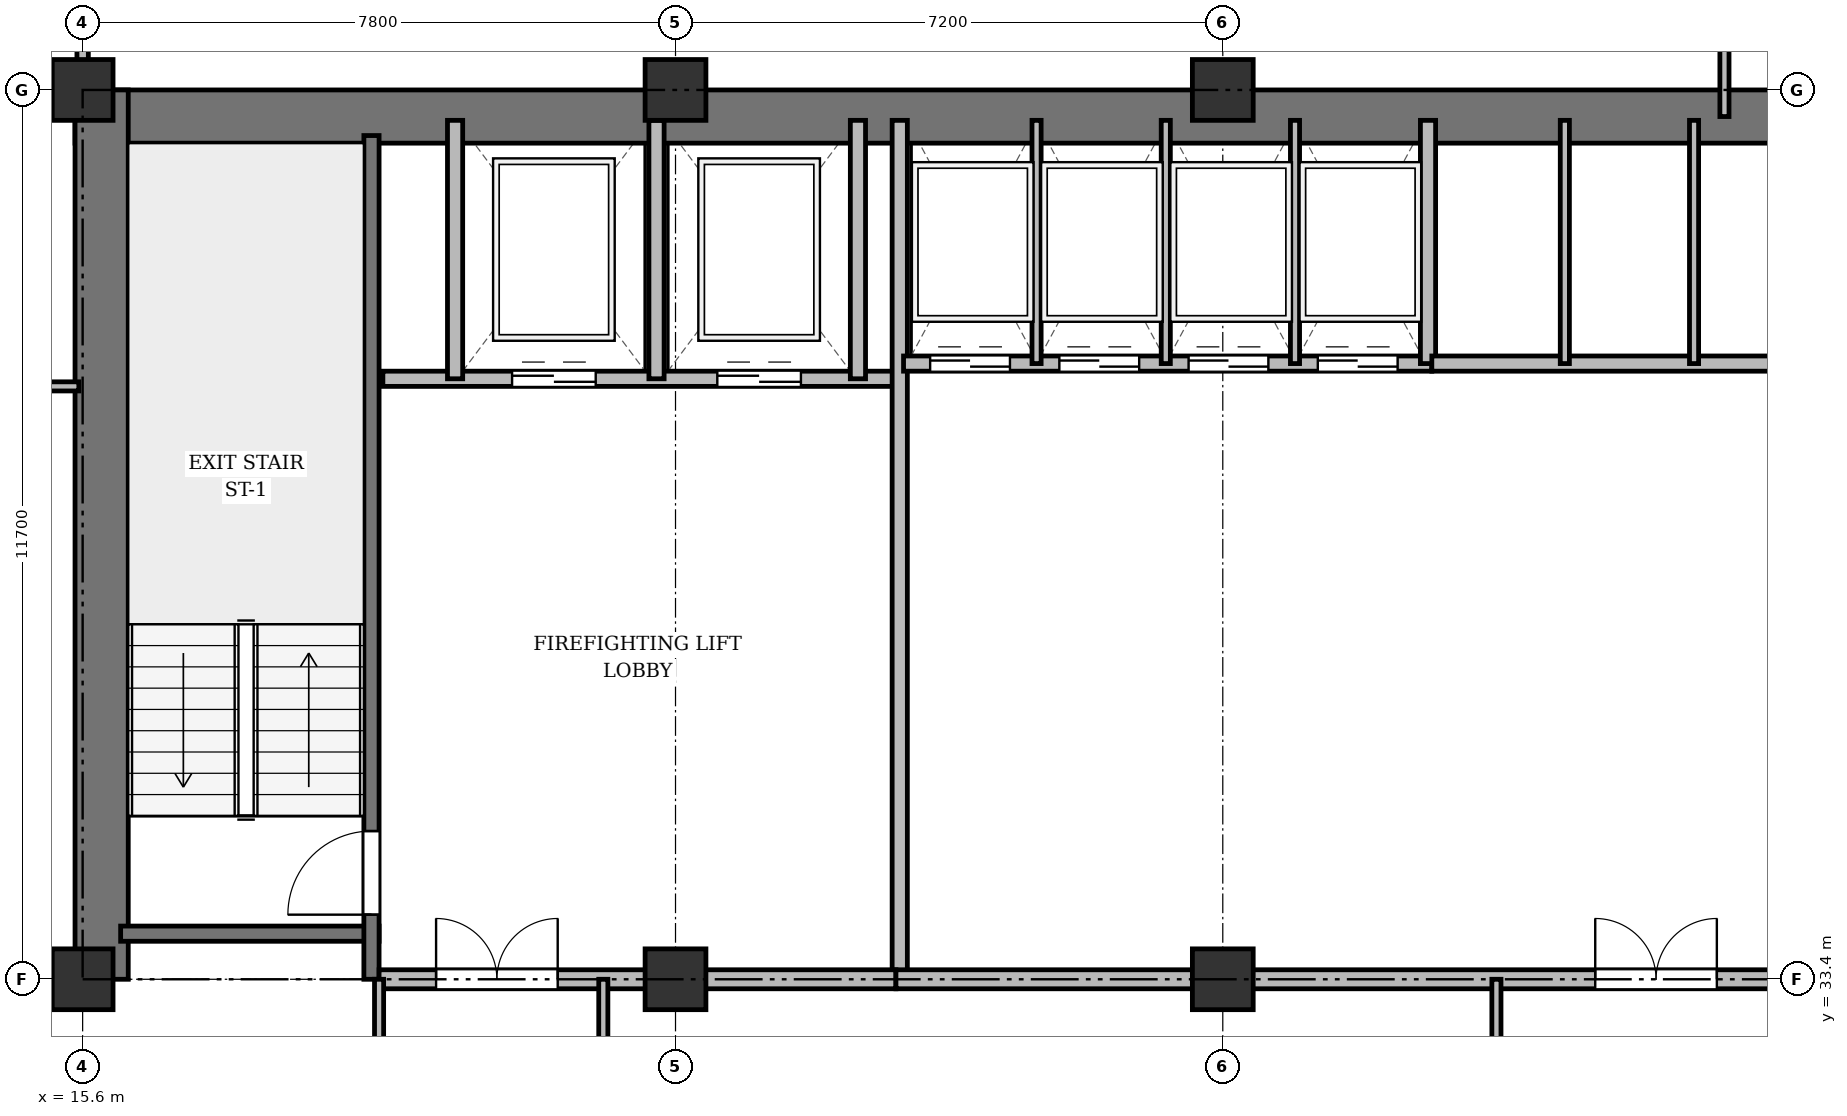
"""IFC4 building model, lengths in metres.
Left out: names, types, materials, properties, quantities, classifications, styles, units other than length and angle.
Written with IfcOpenShell. Run it as: python <this file> out.ifc"""

import sys

from ifc_helpers import new_model, si_unit, direction, frame, frame_2d, origin, origin_2d, place, context, subcontext, project, spatial, rectangle, extrude, source, transform, mapped, element, fill, save


model = new_model("IFC4")
c1 = context("Model", 3, precision=1e-05, world=origin(), true_north=direction((0.0, 1.0)))
c2 = subcontext(c1, "Body", "Model", "MODEL_VIEW")
j1 = project(units=[si_unit("LENGTHUNIT", "METRE"), si_unit("PLANEANGLEUNIT", "RADIAN")], contexts=[c1])
p1 = place(None, origin())
s1 = spatial("IfcSite", under=j1, at=p1, CompositionType="ELEMENT")
p2 = place(p1, origin())
s2 = spatial("IfcBuilding", under=s1, at=p2, CompositionType="ELEMENT")
p3 = place(p2, frame((0.0, 0.0, 81.7)))
s3 = spatial("IfcBuildingStorey", under=s2, at=p3, CompositionType="ELEMENT", Elevation=81.7)
m1 = source(origin(), c2, "Body", "SweptSolid", [
    extrude(rectangle(XDim=0.8, YDim=0.8, at=origin_2d()), origin(), (0.0, 0.0, 1.0), 3.6),
])
for number, where, z_axis, x_axis in (
    (1, (15.6, 33.4, 0.0), (0.0, 0.0, 1.0), (1.0, 0.0, 0.0)),
    (2, (15.6, 45.1, 0.0), (0.0, 0.0, 1.0), (1.0, 0.0, 0.0)),
    (3, (23.4, 33.4, 0.0), (0.0, 0.0, 1.0), (1.0, 0.0, 0.0)),
    (4, (23.4, 45.1, 0.0), (0.0, 0.0, 1.0), (1.0, 0.0, 0.0)),
    (5, (30.6, 33.4, 0.0), (0.0, 0.0, 1.0), (1.0, 0.0, 0.0)),
    (6, (30.6, 45.1, 0.0), (0.0, 0.0, 1.0), (1.0, 0.0, 0.0)),
):
    element("IfcColumn", number, at=place(p3, frame(where, z_axis=z_axis, x_axis=x_axis)), inside=s3, PredefinedType="COLUMN", context=c2, shape_type="MappedRepresentation", body=[
        mapped(m1, transform((0.0, 0.0, 0.0), x_axis=(1.0, 0.0, 0.0), y_axis=(0.0, 1.0, 0.0), z_axis=(0.0, 0.0, 1.0), scale=1.0)),
    ])
p4 = place(p3, frame((15.5, 44.75, 0.0), z_axis=(0.0, 0.0, 1.0), x_axis=(1.0, 0.0, 0.0)))
e7 = element("IfcWall", 7, at=p4, inside=s3, PredefinedType="SHEAR", context=c2, shape_type="SweptSolid", body=[
    extrude(rectangle(XDim=43.4, YDim=0.7, at=frame_2d((21.7, 0.0))), origin(), (0.0, 0.0, 1.0), 3.34),
])
p5 = place(p3, frame((15.85, 33.4, 0.0), z_axis=(0.0, 0.0, 1.0), x_axis=(0.0, 1.0, 0.0)))
e8 = element("IfcWall", 8, at=p5, inside=s3, PredefinedType="SHEAR", context=c2, shape_type="SweptSolid", body=[
    extrude(rectangle(XDim=11.7, YDim=0.7, at=frame_2d((5.85, 0.0))), origin(), (0.0, 0.0, 1.0), 3.34),
])
p6 = place(p3, frame((16.1, 34.0, 0.0), z_axis=(0.0, 0.0, 1.0), x_axis=(1.0, 0.0, 0.0)))
e9 = element("IfcWall", 9, at=p6, inside=s3, PredefinedType="SHEAR", context=c2, shape_type="SweptSolid", body=[
    extrude(rectangle(XDim=3.4, YDim=0.2, at=frame_2d((1.7, 0.0))), origin(), (0.0, 0.0, 1.0), 3.34),
])
p7 = place(p3, frame((19.4, 33.4, 0.0), z_axis=(0.0, 0.0, 1.0), x_axis=(0.0, 1.0, 0.0)))
e10 = element("IfcWall", 10, at=p7, inside=s3, PredefinedType="SHEAR", context=c2, shape_type="SweptSolid", body=[
    extrude(rectangle(XDim=11.1, YDim=0.2, at=frame_2d((5.55, 0.0))), origin(), (0.0, 0.0, 1.0), 3.34),
])
p8 = place(p7, frame((0.85, 0.0, 0.0)))
e11 = element("IfcOpeningElement", 11, at=p8, cuts=e10, PredefinedType="OPENING", context=c2, shape_type="SweptSolid", body=[
    extrude(rectangle(XDim=1.1, YDim=2.15, at=frame_2d((0.55, 1.075))), frame((0.0, 0.11, 0.0), z_axis=(0.0, -1.0, 0.0), x_axis=(1.0, 0.0, 0.0)), (0.0, 0.0, 1.0), 0.22),
])
p9 = place(p3, frame((19.55, 41.3, 0.0), z_axis=(0.0, 0.0, 1.0), x_axis=(1.0, 0.0, 0.0)))
e12 = element("IfcWall", 12, at=p9, inside=s3, PredefinedType="SOLIDWALL", context=c2, shape_type="SweptSolid", body=[
    extrude(rectangle(XDim=6.75, YDim=0.2, at=frame_2d((3.375, 0.0))), origin(), (0.0, 0.0, 1.0), 3.34),
])
p10 = place(p9, frame((1.7, 0.0, 0.0)))
e13 = element("IfcOpeningElement", 13, at=p10, cuts=e12, PredefinedType="OPENING", context=c2, shape_type="SweptSolid", body=[
    extrude(rectangle(XDim=1.1, YDim=2.15, at=frame_2d((0.55, 1.075))), frame((0.0, 0.11, 0.0), z_axis=(0.0, -1.0, 0.0), x_axis=(1.0, 0.0, 0.0)), (0.0, 0.0, 1.0), 0.22),
])
p11 = place(p9, frame((4.4, 0.0, 0.0)))
e14 = element("IfcOpeningElement", 14, at=p11, cuts=e12, PredefinedType="OPENING", context=c2, shape_type="SweptSolid", body=[
    extrude(rectangle(XDim=1.1, YDim=2.15, at=frame_2d((0.55, 1.075))), frame((0.0, 0.11, 0.0), z_axis=(0.0, -1.0, 0.0), x_axis=(1.0, 0.0, 0.0)), (0.0, 0.0, 1.0), 0.22),
])
for number, where, z_axis, x_axis in (
    (15, (20.5, 41.3, 0.0), (0.0, 0.0, 1.0), (0.0, 1.0, 0.0)),
    (16, (23.15, 41.3, 0.0), (0.0, 0.0, 1.0), (0.0, 1.0, 0.0)),
    (17, (25.8, 41.3, 0.0), (0.0, 0.0, 1.0), (0.0, 1.0, 0.0)),
):
    element("IfcWall", number, at=place(p3, frame(where, z_axis=z_axis, x_axis=x_axis)), inside=s3, PredefinedType="SOLIDWALL", context=c2, shape_type="SweptSolid", body=[
        extrude(rectangle(XDim=3.4, YDim=0.2, at=frame_2d((1.7, 0.0))), origin(), (0.0, 0.0, 1.0), 3.34),
    ])
p12 = place(p3, frame((26.35, 33.4, 0.0), z_axis=(0.0, 0.0, 1.0), x_axis=(0.0, 1.0, 0.0)))
e18 = element("IfcWall", 18, at=p12, inside=s3, PredefinedType="SOLIDWALL", context=c2, shape_type="SweptSolid", body=[
    extrude(rectangle(XDim=11.3, YDim=0.2, at=frame_2d((5.65, 0.0))), origin(), (0.0, 0.0, 1.0), 2.752),
])
p13 = place(p3, frame((19.5, 33.4, 0.0), z_axis=(0.0, 0.0, 1.0), x_axis=(1.0, 0.0, 0.0)))
e19 = element("IfcWall", 19, at=p13, inside=s3, PredefinedType="PARTITIONING", context=c2, shape_type="SweptSolid", body=[
    extrude(rectangle(XDim=6.8, YDim=0.25, at=frame_2d((3.4, 0.0))), origin(), (0.0, 0.0, 1.0), 2.752),
])
p14 = place(p13, frame((0.75, 0.0, 0.0)))
e20 = element("IfcOpeningElement", 20, at=p14, cuts=e19, PredefinedType="OPENING", context=c2, shape_type="SweptSolid", body=[
    extrude(rectangle(XDim=1.6, YDim=2.2, at=frame_2d((0.8, 1.1))), frame((0.0, 0.135, 0.0), z_axis=(0.0, -1.0, 0.0), x_axis=(1.0, 0.0, 0.0)), (0.0, 0.0, 1.0), 0.27),
])
p15 = place(p3, frame((26.4, 41.5, 0.0), z_axis=(0.0, 0.0, 1.0), x_axis=(1.0, 0.0, 0.0)))
e21 = element("IfcWall", 21, at=p15, inside=s3, PredefinedType="SOLIDWALL", context=c2, shape_type="SweptSolid", body=[
    extrude(rectangle(XDim=6.95, YDim=0.2, at=frame_2d((3.475, 0.0))), origin(), (0.0, 0.0, 1.0), 3.34),
])
p16 = place(p15, frame((0.35, 0.0, 0.0)))
e22 = element("IfcOpeningElement", 22, at=p16, cuts=e21, PredefinedType="OPENING", context=c2, shape_type="SweptSolid", body=[
    extrude(rectangle(XDim=1.05, YDim=2.15, at=frame_2d((0.525, 1.075))), frame((0.0, 0.11, 0.0), z_axis=(0.0, -1.0, 0.0), x_axis=(1.0, 0.0, 0.0)), (0.0, 0.0, 1.0), 0.22),
])
p17 = place(p15, frame((2.05, 0.0, 0.0)))
e23 = element("IfcOpeningElement", 23, at=p17, cuts=e21, PredefinedType="OPENING", context=c2, shape_type="SweptSolid", body=[
    extrude(rectangle(XDim=1.05, YDim=2.15, at=frame_2d((0.525, 1.075))), frame((0.0, 0.11, 0.0), z_axis=(0.0, -1.0, 0.0), x_axis=(1.0, 0.0, 0.0)), (0.0, 0.0, 1.0), 0.22),
])
p18 = place(p15, frame((3.75, 0.0, 0.0)))
e24 = element("IfcOpeningElement", 24, at=p18, cuts=e21, PredefinedType="OPENING", context=c2, shape_type="SweptSolid", body=[
    extrude(rectangle(XDim=1.05, YDim=2.15, at=frame_2d((0.525, 1.075))), frame((0.0, 0.11, 0.0), z_axis=(0.0, -1.0, 0.0), x_axis=(1.0, 0.0, 0.0)), (0.0, 0.0, 1.0), 0.22),
])
p19 = place(p15, frame((5.45, 0.0, 0.0)))
e25 = element("IfcOpeningElement", 25, at=p19, cuts=e21, PredefinedType="OPENING", context=c2, shape_type="SweptSolid", body=[
    extrude(rectangle(XDim=1.05, YDim=2.15, at=frame_2d((0.525, 1.075))), frame((0.0, 0.11, 0.0), z_axis=(0.0, -1.0, 0.0), x_axis=(1.0, 0.0, 0.0)), (0.0, 0.0, 1.0), 0.22),
])
p20 = place(p3, frame((33.3, 41.5, 0.0), z_axis=(0.0, 0.0, 1.0), x_axis=(0.0, 1.0, 0.0)))
e26 = element("IfcWall", 26, at=p20, inside=s3, PredefinedType="SOLIDWALL", context=c2, shape_type="SweptSolid", body=[
    extrude(rectangle(XDim=3.2, YDim=0.2, at=frame_2d((1.6, 0.0))), origin(), (0.0, 0.0, 1.0), 3.34),
])
for number, where, z_axis, x_axis in (
    (27, (28.15, 41.5, 0.0), (0.0, 0.0, 1.0), (0.0, 1.0, 0.0)),
    (28, (29.85, 41.5, 0.0), (0.0, 0.0, 1.0), (0.0, 1.0, 0.0)),
    (29, (31.55, 41.5, 0.0), (0.0, 0.0, 1.0), (0.0, 1.0, 0.0)),
):
    element("IfcWall", number, at=place(p3, frame(where, z_axis=z_axis, x_axis=x_axis)), inside=s3, PredefinedType="PARTITIONING", context=c2, shape_type="SweptSolid", body=[
        extrude(rectangle(XDim=3.2, YDim=0.12, at=frame_2d((1.6, 0.0))), origin(), (0.0, 0.0, 1.0), 3.34),
    ])
p21 = place(p3, frame((33.35, 41.5, 0.0), z_axis=(0.0, 0.0, 1.0), x_axis=(1.0, 0.0, 0.0)))
e30 = element("IfcWall", 30, at=p21, inside=s3, PredefinedType="SOLIDWALL", context=c2, shape_type="SweptSolid", body=[
    extrude(rectangle(XDim=6.9, YDim=0.2, at=frame_2d((3.45, 0.0))), origin(), (0.0, 0.0, 1.0), 3.34),
])
for number, where, z_axis, x_axis in (
    (31, (35.1, 41.5, 0.0), (0.0, 0.0, 1.0), (0.0, 1.0, 0.0)),
    (32, (36.8, 41.5, 0.0), (0.0, 0.0, 1.0), (0.0, 1.0, 0.0)),
):
    element("IfcWall", number, at=place(p3, frame(where, z_axis=z_axis, x_axis=x_axis)), inside=s3, PredefinedType="PARTITIONING", context=c2, shape_type="SweptSolid", body=[
        extrude(rectangle(XDim=3.2, YDim=0.12, at=frame_2d((1.6, 0.0))), origin(), (0.0, 0.0, 1.0), 3.34),
    ])
p22 = place(p3, frame((26.3, 33.4, 0.0), z_axis=(0.0, 0.0, 1.0), x_axis=(1.0, 0.0, 0.0)))
e33 = element("IfcWall", 33, at=p22, inside=s3, PredefinedType="PARTITIONING", context=c2, shape_type="SweptSolid", body=[
    extrude(rectangle(XDim=20.85, YDim=0.25, at=frame_2d((10.425, 0.0))), origin(), (0.0, 0.0, 1.0), 2.752),
])
p23 = place(p22, frame((9.2, 0.0, 0.0)))
e34 = element("IfcOpeningElement", 34, at=p23, cuts=e33, PredefinedType="OPENING", context=c2, shape_type="SweptSolid", body=[
    extrude(rectangle(XDim=1.6, YDim=2.2, at=frame_2d((0.8, 1.1))), frame((0.0, 0.135, 0.0), z_axis=(0.0, -1.0, 0.0), x_axis=(1.0, 0.0, 0.0)), (0.0, 0.0, 1.0), 0.27),
])
for number, where, z_axis, x_axis in (
    (35, (19.5, 29.8, 0.0), (0.0, 0.0, 1.0), (0.0, 1.0, 0.0)),
    (36, (22.45, 29.8, 0.0), (0.0, 0.0, 1.0), (0.0, 1.0, 0.0)),
    (37, (34.2, 29.8, 0.0), (0.0, 0.0, 1.0), (0.0, 1.0, 0.0)),
):
    element("IfcWall", number, at=place(p3, frame(where, z_axis=z_axis, x_axis=x_axis)), inside=s3, PredefinedType="PARTITIONING", context=c2, shape_type="SweptSolid", body=[
        extrude(rectangle(XDim=3.6, YDim=0.12, at=frame_2d((1.8, 0.0))), origin(), (0.0, 0.0, 1.0), 2.752),
    ])
p24 = place(p3, frame((4.8, 41.2, 0.0), z_axis=(0.0, 0.0, 1.0), x_axis=(1.0, 0.0, 0.0)))
e38 = element("IfcWall", 38, at=p24, inside=s3, PredefinedType="PARTITIONING", context=c2, shape_type="SweptSolid", body=[
    extrude(rectangle(XDim=10.75, YDim=0.12, at=frame_2d((5.375, 0.0))), origin(), (0.0, 0.0, 1.0), 2.84),
])
p25 = place(p24, frame((4.9, 0.0, 0.0)))
e39 = element("IfcOpeningElement", 39, at=p25, cuts=e38, PredefinedType="OPENING", context=c2, shape_type="SweptSolid", body=[
    extrude(rectangle(XDim=0.95, YDim=2.15, at=frame_2d((0.475, 1.075))), frame((0.0, 0.07, 0.0), z_axis=(0.0, -1.0, 0.0), x_axis=(1.0, 0.0, 0.0)), (0.0, 0.0, 1.0), 0.14),
])
p26 = place(p3, frame((4.75, 33.4, 0.0), z_axis=(0.0, 0.0, 1.0), x_axis=(1.0, 0.0, 0.0)))
e40 = element("IfcWall", 40, at=p26, inside=s3, PredefinedType="PARTITIONING", context=c2, shape_type="SweptSolid", body=[
    extrude(rectangle(XDim=10.85, YDim=0.15, at=frame_2d((5.425, 0.0))), origin(), (0.0, 0.0, 1.0), 2.752),
])
p27 = place(p26, frame((4.94, 0.0, 0.0)))
e41 = element("IfcOpeningElement", 41, at=p27, cuts=e40, PredefinedType="OPENING", context=c2, shape_type="SweptSolid", body=[
    extrude(rectangle(XDim=0.95, YDim=2.15, at=frame_2d((0.475, 1.075))), frame((0.0, 0.085, 0.0), z_axis=(0.0, -1.0, 0.0), x_axis=(1.0, 0.0, 0.0)), (0.0, 0.0, 1.0), 0.17),
])
p28 = place(p3, frame((37.2, 44.75, 0.0), z_axis=(0.0, 0.0, 1.0), x_axis=(0.0, 1.0, 0.0)))
e42 = element("IfcWall", 42, at=p28, inside=s3, PredefinedType="PARTITIONING", context=c2, shape_type="SweptSolid", body=[
    extrude(rectangle(XDim=3.61, YDim=0.12, at=frame_2d((1.805, 0.0))), origin(), (0.0, 0.0, 1.0), 2.752),
])
p29 = place(p28, frame((1.1, 0.0, 0.0)))
e43 = element("IfcOpeningElement", 43, at=p29, cuts=e42, PredefinedType="OPENING", context=c2, shape_type="SweptSolid", body=[
    extrude(rectangle(XDim=0.95, YDim=2.15, at=frame_2d((0.475, 1.075))), frame((0.0, 0.07, 0.0), z_axis=(0.0, -1.0, 0.0), x_axis=(1.0, 0.0, 0.0)), (0.0, 0.0, 1.0), 0.14),
])
p30 = place(p3, frame((15.6, 44.75, 0.0), z_axis=(0.0, 0.0, 1.0), x_axis=(0.0, 1.0, 0.0)))
e44 = element("IfcWall", 44, at=p30, inside=s3, PredefinedType="PARTITIONING", context=c2, shape_type="SweptSolid", body=[
    extrude(rectangle(XDim=3.61, YDim=0.15, at=frame_2d((1.805, 0.0))), origin(), (0.0, 0.0, 1.0), 2.84),
])
p31 = place(p30, frame((1.1, 0.0, 0.0)))
e45 = element("IfcOpeningElement", 45, at=p31, cuts=e44, PredefinedType="OPENING", context=c2, shape_type="SweptSolid", body=[
    extrude(rectangle(XDim=0.95, YDim=2.15, at=frame_2d((0.475, 1.075))), frame((0.0, 0.085, 0.0), z_axis=(0.0, -1.0, 0.0), x_axis=(1.0, 0.0, 0.0)), (0.0, 0.0, 1.0), 0.17),
])
m2 = source(origin(), c2, "Body", "SweptSolid", [
    extrude(rectangle(XDim=1.1, YDim=2.15, at=frame_2d((0.55, 1.075))), frame((0.0, 0.025, 0.0), z_axis=(0.0, -1.0, 0.0), x_axis=(1.0, 0.0, 0.0)), (0.0, 0.0, 1.0), 0.05),
])
p32 = place(p8, origin())
e46 = element("IfcDoor", 46, at=p32, inside=s3, OperationType="SINGLE_SWING_LEFT", PredefinedType="DOOR", context=c2, shape_type="MappedRepresentation", body=[
    mapped(m2, transform((0.0, 0.0, 0.0), x_axis=(1.0, 0.0, 0.0), y_axis=(0.0, 1.0, 0.0), z_axis=(0.0, 0.0, 1.0), scale=1.0)),
])
fill(e11, e46)
p33 = place(p10, origin())
e47 = element("IfcDoor", 47, at=p33, inside=s3, OperationType="DOUBLE_DOOR_SLIDING", PredefinedType="DOOR", context=c2, shape_type="MappedRepresentation", body=[
    mapped(m2, transform((0.0, 0.0, 0.0), x_axis=(1.0, 0.0, 0.0), y_axis=(0.0, 1.0, 0.0), z_axis=(0.0, 0.0, 1.0), scale=1.0)),
])
fill(e13, e47)
p34 = place(p11, origin())
e48 = element("IfcDoor", 48, at=p34, inside=s3, OperationType="DOUBLE_DOOR_SLIDING", PredefinedType="DOOR", context=c2, shape_type="MappedRepresentation", body=[
    mapped(m2, transform((0.0, 0.0, 0.0), x_axis=(1.0, 0.0, 0.0), y_axis=(0.0, 1.0, 0.0), z_axis=(0.0, 0.0, 1.0), scale=1.0)),
])
fill(e14, e48)
m3 = source(origin(), c2, "Body", "SweptSolid", [
    extrude(rectangle(XDim=1.6, YDim=2.2, at=frame_2d((0.8, 1.1))), frame((0.0, 0.025, 0.0), z_axis=(0.0, -1.0, 0.0), x_axis=(1.0, 0.0, 0.0)), (0.0, 0.0, 1.0), 0.05),
])
p35 = place(p14, origin())
e49 = element("IfcDoor", 49, at=p35, inside=s3, OperationType="DOUBLE_DOOR_SINGLE_SWING", PredefinedType="DOOR", context=c2, shape_type="MappedRepresentation", body=[
    mapped(m3, transform((0.0, 0.0, 0.0), x_axis=(1.0, 0.0, 0.0), y_axis=(0.0, 1.0, 0.0), z_axis=(0.0, 0.0, 1.0), scale=1.0)),
])
fill(e20, e49)
m4 = source(origin(), c2, "Body", "SweptSolid", [
    extrude(rectangle(XDim=1.05, YDim=2.15, at=frame_2d((0.525, 1.075))), frame((0.0, 0.025, 0.0), z_axis=(0.0, -1.0, 0.0), x_axis=(1.0, 0.0, 0.0)), (0.0, 0.0, 1.0), 0.05),
])
p36 = place(p16, origin())
e50 = element("IfcDoor", 50, at=p36, inside=s3, OperationType="DOUBLE_DOOR_SLIDING", PredefinedType="DOOR", context=c2, shape_type="MappedRepresentation", body=[
    mapped(m4, transform((0.0, 0.0, 0.0), x_axis=(1.0, 0.0, 0.0), y_axis=(0.0, 1.0, 0.0), z_axis=(0.0, 0.0, 1.0), scale=1.0)),
])
fill(e22, e50)
p37 = place(p17, origin())
e51 = element("IfcDoor", 51, at=p37, inside=s3, OperationType="DOUBLE_DOOR_SLIDING", PredefinedType="DOOR", context=c2, shape_type="MappedRepresentation", body=[
    mapped(m4, transform((0.0, 0.0, 0.0), x_axis=(1.0, 0.0, 0.0), y_axis=(0.0, 1.0, 0.0), z_axis=(0.0, 0.0, 1.0), scale=1.0)),
])
fill(e23, e51)
p38 = place(p18, origin())
e52 = element("IfcDoor", 52, at=p38, inside=s3, OperationType="DOUBLE_DOOR_SLIDING", PredefinedType="DOOR", context=c2, shape_type="MappedRepresentation", body=[
    mapped(m4, transform((0.0, 0.0, 0.0), x_axis=(1.0, 0.0, 0.0), y_axis=(0.0, 1.0, 0.0), z_axis=(0.0, 0.0, 1.0), scale=1.0)),
])
fill(e24, e52)
p39 = place(p19, origin())
e53 = element("IfcDoor", 53, at=p39, inside=s3, OperationType="DOUBLE_DOOR_SLIDING", PredefinedType="DOOR", context=c2, shape_type="MappedRepresentation", body=[
    mapped(m4, transform((0.0, 0.0, 0.0), x_axis=(1.0, 0.0, 0.0), y_axis=(0.0, 1.0, 0.0), z_axis=(0.0, 0.0, 1.0), scale=1.0)),
])
fill(e25, e53)
p40 = place(p23, origin())
e54 = element("IfcDoor", 54, at=p40, inside=s3, OperationType="DOUBLE_DOOR_SINGLE_SWING", PredefinedType="DOOR", context=c2, shape_type="MappedRepresentation", body=[
    mapped(m3, transform((0.0, 0.0, 0.0), x_axis=(1.0, 0.0, 0.0), y_axis=(0.0, 1.0, 0.0), z_axis=(0.0, 0.0, 1.0), scale=1.0)),
])
fill(e34, e54)
save(model, sys.argv[1])
